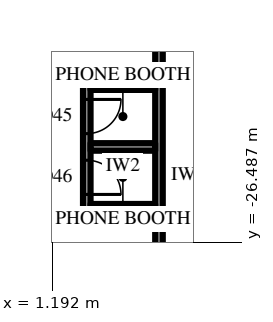
"""IFC4 building model, lengths in metres.
Left out: names, types, materials, properties, quantities, classifications, styles, units other than length and angle.
Written with IfcOpenShell. Run it as: python <this file> out.ifc"""

import sys

from ifc_helpers import new_model, si_unit, direction, frame, frame_2d, origin, place, context, subcontext, project, spatial, rectangle, extrude, element, fill, save


model = new_model("IFC4")
c1 = context("Model", 3, precision=1e-05, world=origin(), true_north=direction((0.0, 1.0)))
c2 = subcontext(c1, "Body", "Model", "MODEL_VIEW")
j1 = project(units=[si_unit("LENGTHUNIT", "METRE"), si_unit("PLANEANGLEUNIT", "RADIAN")], contexts=[c1])
p1 = place(None, origin())
s1 = spatial("IfcSite", under=j1, at=p1, CompositionType="ELEMENT")
p2 = place(p1, origin())
s2 = spatial("IfcBuilding", under=s1, at=p2, CompositionType="ELEMENT")
p3 = place(p2, frame((0.0, 0.0, 69.7)))
s3 = spatial("IfcBuildingStorey", under=s2, at=p3, CompositionType="ELEMENT", Elevation=69.7)
p4 = place(p3, frame((4.0, -18.7, 0.0), z_axis=(0.0, 0.0, 1.0), x_axis=(0.0, -1.0, 0.0)))
e1 = element("IfcWall", 1, at=p4, inside=s3, PredefinedType="PARTITIONING", context=c2, shape_type="SweptSolid", body=[
    extrude(rectangle(XDim=15.1, YDim=0.2, at=frame_2d((7.55, 0.0))), origin(), (0.0, 0.0, 1.0), 4.0),
])
p5 = place(p4, frame((1.01, 0.0, 0.0)))
e2 = element("IfcOpeningElement", 2, at=p5, cuts=e1, PredefinedType="OPENING", context=c2, shape_type="SweptSolid", body=[
    extrude(rectangle(XDim=1.0, YDim=2.2, at=frame_2d((0.5, 1.1))), frame((0.0, 0.11, 0.0), z_axis=(0.0, -1.0, 0.0), x_axis=(1.0, 0.0, 0.0)), (0.0, 0.0, 1.0), 0.22),
])
p6 = place(p3, frame((2.1, -22.285, 0.0), z_axis=(0.0, 0.0, 1.0), x_axis=(0.0, -1.0, 0.0)))
e3 = element("IfcWall", 3, at=p6, inside=s3, PredefinedType="PARTITIONING", context=c2, shape_type="SweptSolid", body=[
    extrude(rectangle(XDim=3.4, YDim=0.2, at=frame_2d((1.7, 0.0))), origin(), (0.0, 0.0, 1.0), 4.0),
])
p7 = place(p6, frame((0.45, 0.0, 0.0)))
e4 = element("IfcOpeningElement", 4, at=p7, cuts=e3, PredefinedType="OPENING", context=c2, shape_type="SweptSolid", body=[
    extrude(rectangle(XDim=0.9, YDim=2.2, at=frame_2d((0.45, 1.1))), frame((0.0, 0.11, 0.0), z_axis=(0.0, -1.0, 0.0), x_axis=(1.0, 0.0, 0.0)), (0.0, 0.0, 1.0), 0.22),
])
p8 = place(p6, frame((2.05, 0.0, 0.0)))
e5 = element("IfcOpeningElement", 5, at=p8, cuts=e3, PredefinedType="OPENING", context=c2, shape_type="SweptSolid", body=[
    extrude(rectangle(XDim=0.9, YDim=2.2, at=frame_2d((0.45, 1.1))), frame((0.0, 0.11, 0.0), z_axis=(0.0, -1.0, 0.0), x_axis=(1.0, 0.0, 0.0)), (0.0, 0.0, 1.0), 0.22),
])
for number, where, z_axis, x_axis in (
    (6, (3.9, -22.385, 0.0), (0.0, 0.0, 1.0), (-1.0, 0.0, 0.0)),
    (7, (3.9, -23.985, 0.0), (0.0, 0.0, 1.0), (-1.0, 0.0, 0.0)),
    (8, (3.9, -25.585, 0.0), (0.0, 0.0, 1.0), (-1.0, 0.0, 0.0)),
):
    element("IfcWall", number, at=place(p3, frame(where, z_axis=z_axis, x_axis=x_axis)), inside=s3, PredefinedType="PARTITIONING", context=c2, shape_type="SweptSolid", body=[
        extrude(rectangle(XDim=1.7, YDim=0.2, at=frame_2d((0.85, 0.0))), origin(), (0.0, 0.0, 1.0), 4.0),
    ])
p9 = place(p7, origin())
e9 = element("IfcDoor", 9, at=p9, inside=s3, OperationType="SINGLE_SWING_RIGHT", PredefinedType="DOOR", context=c2, shape_type="SweptSolid", body=[
    extrude(rectangle(XDim=0.9, YDim=2.2, at=frame_2d((0.45, 1.1))), frame((0.0, 0.025, 0.0), z_axis=(0.0, -1.0, 0.0), x_axis=(1.0, 0.0, 0.0)), (0.0, 0.0, 1.0), 0.05),
])
fill(e4, e9)
p10 = place(p8, origin())
e10 = element("IfcDoor", 10, at=p10, inside=s3, OperationType="SINGLE_SWING_LEFT", PredefinedType="DOOR", context=c2, shape_type="SweptSolid", body=[
    extrude(rectangle(XDim=0.9, YDim=2.2, at=frame_2d((0.45, 1.1))), frame((0.0, 0.025, 0.0), z_axis=(0.0, -1.0, 0.0), x_axis=(1.0, 0.0, 0.0)), (0.0, 0.0, 1.0), 0.05),
])
fill(e5, e10)
save(model, sys.argv[1])
